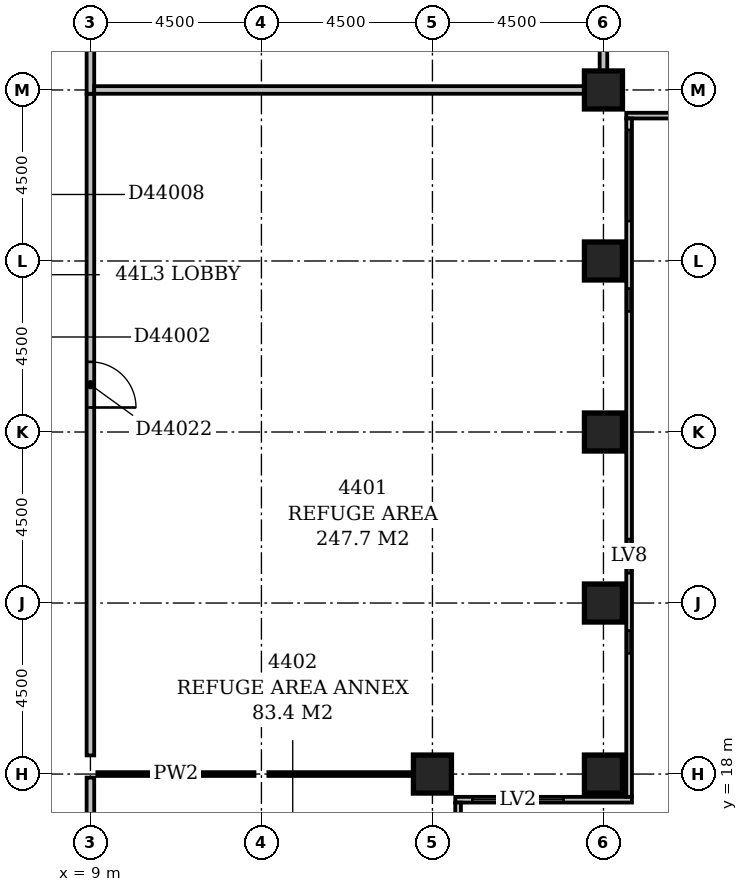
"""IFC4 building model, lengths in metres.
Left out: names, types, materials, properties, quantities, classifications, styles, units other than length and angle.
Written with IfcOpenShell. Run it as: python <this file> out.ifc"""

import sys

from ifc_helpers import new_model, si_unit, direction, frame, frame_2d, origin, origin_2d, place, context, subcontext, project, spatial, rectangle, extrude, element, fill, save


model = new_model("IFC4")
c1 = context("Model", 3, precision=1e-05, world=origin(), true_north=direction((0.0, 1.0)))
c2 = subcontext(c1, "Body", "Model", "MODEL_VIEW")
j1 = project(units=[si_unit("LENGTHUNIT", "METRE"), si_unit("PLANEANGLEUNIT", "RADIAN")], contexts=[c1])
p1 = place(None, origin())
s1 = spatial("IfcSite", under=j1, at=p1, CompositionType="ELEMENT")
p2 = place(p1, origin())
s2 = spatial("IfcBuilding", under=s1, at=p2, CompositionType="ELEMENT")
p3 = place(p2, frame((0.0, 0.0, 173.6)))
s3 = spatial("IfcBuildingStorey", under=s2, at=p3, CompositionType="ELEMENT", Elevation=173.6)
for number, where, z_axis, x_axis in (
    (1, (18.0, 18.0, -0.45), (0.0, 0.0, 1.0), (1.0, 0.0, 0.0)),
    (2, (22.5, 18.0, -0.45), (0.0, 0.0, 1.0), (1.0, 0.0, 0.0)),
    (3, (22.5, 22.5, -0.45), (0.0, 0.0, 1.0), (1.0, 0.0, 0.0)),
    (4, (22.5, 27.0, -0.45), (0.0, 0.0, 1.0), (1.0, 0.0, 0.0)),
    (5, (22.5, 31.5, -0.45), (0.0, 0.0, 1.0), (1.0, 0.0, 0.0)),
    (6, (22.5, 36.0, -0.45), (0.0, 0.0, 1.0), (1.0, 0.0, 0.0)),
):
    element("IfcColumn", number, at=place(p3, frame(where, z_axis=z_axis, x_axis=x_axis)), inside=s3, PredefinedType="COLUMN", context=c2, shape_type="SweptSolid", body=[
        extrude(rectangle(XDim=1.0, YDim=1.0, at=origin_2d()), origin(), (0.0, 0.0, 1.0), 5.55),
    ])
p4 = place(p3, frame((18.675, 8.4, 0.0), z_axis=(0.0, 0.0, 1.0), x_axis=(0.0, 1.0, 0.0)))
e7 = element("IfcWall", 7, at=p4, inside=s3, PredefinedType="STANDARD", context=c2, shape_type="SweptSolid", body=[
    extrude(rectangle(XDim=8.85, YDim=0.15, at=frame_2d((4.425, 0.0))), origin(), (0.0, 0.0, 1.0), 4.5),
])
p5 = place(p4, frame((1.467, 0.0, 0.6)))
e8 = element("IfcOpeningElement", 8, at=p5, cuts=e7, PredefinedType="OPENING", context=c2, shape_type="SweptSolid", body=[
    extrude(rectangle(XDim=1.8, YDim=2.4, at=frame_2d((0.9, 1.2))), frame((0.0, 0.087, 0.0), z_axis=(0.0, -1.0, 0.0), x_axis=(1.0, 0.0, 0.0)), (0.0, 0.0, 1.0), 0.174),
])
p6 = place(p4, frame((5.825, 0.0, 0.6)))
e9 = element("IfcOpeningElement", 9, at=p6, cuts=e7, PredefinedType="OPENING", context=c2, shape_type="SweptSolid", body=[
    extrude(rectangle(XDim=0.6, YDim=2.4, at=frame_2d((0.3, 1.2))), frame((0.0, 0.087, 0.0), z_axis=(0.0, -1.0, 0.0), x_axis=(1.0, 0.0, 0.0)), (0.0, 0.0, 1.0), 0.174),
])
p7 = place(p3, frame((18.6, 17.325, 0.0), z_axis=(0.0, 0.0, 1.0), x_axis=(1.0, 0.0, 0.0)))
e10 = element("IfcWall", 10, at=p7, inside=s3, PredefinedType="STANDARD", context=c2, shape_type="SweptSolid", body=[
    extrude(rectangle(XDim=4.65, YDim=0.15, at=frame_2d((2.325, 0.0))), origin(), (0.0, 0.0, 1.0), 4.5),
])
p8 = place(p7, frame((0.45, 0.0, 0.6)))
e11 = element("IfcOpeningElement", 11, at=p8, cuts=e10, PredefinedType="OPENING", context=c2, shape_type="SweptSolid", body=[
    extrude(rectangle(XDim=2.4, YDim=2.4, at=frame_2d((1.2, 1.2))), frame((0.0, 0.087, 0.0), z_axis=(0.0, -1.0, 0.0), x_axis=(1.0, 0.0, 0.0)), (0.0, 0.0, 1.0), 0.174),
])
p9 = place(p3, frame((23.175, 17.4, 0.0), z_axis=(0.0, 0.0, 1.0), x_axis=(0.0, 1.0, 0.0)))
e12 = element("IfcWall", 12, at=p9, inside=s3, PredefinedType="STANDARD", context=c2, shape_type="SweptSolid", body=[
    extrude(rectangle(XDim=17.85, YDim=0.15, at=frame_2d((8.925, 0.0))), origin(), (0.0, 0.0, 1.0), 4.5),
])
p10 = place(p9, frame((3.775, 0.0, 0.6)))
e13 = element("IfcOpeningElement", 13, at=p10, cuts=e12, PredefinedType="OPENING", context=c2, shape_type="SweptSolid", body=[
    extrude(rectangle(XDim=0.6, YDim=2.4, at=frame_2d((0.3, 1.2))), frame((0.0, 0.087, 0.0), z_axis=(0.0, -1.0, 0.0), x_axis=(1.0, 0.0, 0.0)), (0.0, 0.0, 1.0), 0.174),
])
p11 = place(p9, frame((5.884, 0.0, 0.6)))
e14 = element("IfcOpeningElement", 14, at=p11, cuts=e12, PredefinedType="OPENING", context=c2, shape_type="SweptSolid", body=[
    extrude(rectangle(XDim=0.9, YDim=2.4, at=frame_2d((0.45, 1.2))), frame((0.0, 0.087, 0.0), z_axis=(0.0, -1.0, 0.0), x_axis=(1.0, 0.0, 0.0)), (0.0, 0.0, 1.0), 0.174),
])
p12 = place(p9, frame((12.775, 0.0, 0.6)))
e15 = element("IfcOpeningElement", 15, at=p12, cuts=e12, PredefinedType="OPENING", context=c2, shape_type="SweptSolid", body=[
    extrude(rectangle(XDim=0.6, YDim=2.4, at=frame_2d((0.3, 1.2))), frame((0.0, 0.087, 0.0), z_axis=(0.0, -1.0, 0.0), x_axis=(1.0, 0.0, 0.0)), (0.0, 0.0, 1.0), 0.174),
])
p13 = place(p9, frame((15.15, 0.0, 0.6)))
e16 = element("IfcOpeningElement", 16, at=p13, cuts=e12, PredefinedType="OPENING", context=c2, shape_type="SweptSolid", body=[
    extrude(rectangle(XDim=2.4, YDim=2.4, at=frame_2d((1.2, 1.2))), frame((0.0, 0.087, 0.0), z_axis=(0.0, -1.0, 0.0), x_axis=(1.0, 0.0, 0.0)), (0.0, 0.0, 1.0), 0.174),
])
p14 = place(p3, frame((23.1, 35.325, 0.0), z_axis=(0.0, 0.0, 1.0), x_axis=(1.0, 0.0, 0.0)))
e17 = element("IfcWall", 17, at=p14, inside=s3, PredefinedType="STANDARD", context=c2, shape_type="SweptSolid", body=[
    extrude(rectangle(XDim=45.15, YDim=0.15, at=frame_2d((22.575, 0.0))), origin(), (0.0, 0.0, 1.0), 4.5),
])
p15 = place(p14, frame((2.575, 0.0, 0.6)))
e18 = element("IfcOpeningElement", 18, at=p15, cuts=e17, PredefinedType="OPENING", context=c2, shape_type="SweptSolid", body=[
    extrude(rectangle(XDim=0.6, YDim=2.4, at=frame_2d((0.3, 1.2))), frame((0.0, 0.087, 0.0), z_axis=(0.0, -1.0, 0.0), x_axis=(1.0, 0.0, 0.0)), (0.0, 0.0, 1.0), 0.174),
])
p16 = place(p14, frame((6.781, 0.0, 0.6)))
e19 = element("IfcOpeningElement", 19, at=p16, cuts=e17, PredefinedType="OPENING", context=c2, shape_type="SweptSolid", body=[
    extrude(rectangle(XDim=0.9, YDim=2.4, at=frame_2d((0.45, 1.2))), frame((0.0, 0.087, 0.0), z_axis=(0.0, -1.0, 0.0), x_axis=(1.0, 0.0, 0.0)), (0.0, 0.0, 1.0), 0.174),
])
p17 = place(p14, frame((11.575, 0.0, 0.6)))
e20 = element("IfcOpeningElement", 20, at=p17, cuts=e17, PredefinedType="OPENING", context=c2, shape_type="SweptSolid", body=[
    extrude(rectangle(XDim=0.6, YDim=2.4, at=frame_2d((0.3, 1.2))), frame((0.0, 0.087, 0.0), z_axis=(0.0, -1.0, 0.0), x_axis=(1.0, 0.0, 0.0)), (0.0, 0.0, 1.0), 0.174),
])
p18 = place(p14, frame((13.95, 0.0, 0.6)))
e21 = element("IfcOpeningElement", 21, at=p18, cuts=e17, PredefinedType="OPENING", context=c2, shape_type="SweptSolid", body=[
    extrude(rectangle(XDim=2.4, YDim=2.4, at=frame_2d((1.2, 1.2))), frame((0.0, 0.087, 0.0), z_axis=(0.0, -1.0, 0.0), x_axis=(1.0, 0.0, 0.0)), (0.0, 0.0, 1.0), 0.174),
])
p19 = place(p14, frame((22.95, 0.0, 0.6)))
e22 = element("IfcOpeningElement", 22, at=p19, cuts=e17, PredefinedType="OPENING", context=c2, shape_type="SweptSolid", body=[
    extrude(rectangle(XDim=2.4, YDim=2.4, at=frame_2d((1.2, 1.2))), frame((0.0, 0.087, 0.0), z_axis=(0.0, -1.0, 0.0), x_axis=(1.0, 0.0, 0.0)), (0.0, 0.0, 1.0), 0.174),
])
p20 = place(p14, frame((29.575, 0.0, 0.6)))
e23 = element("IfcOpeningElement", 23, at=p20, cuts=e17, PredefinedType="OPENING", context=c2, shape_type="SweptSolid", body=[
    extrude(rectangle(XDim=0.6, YDim=2.4, at=frame_2d((0.3, 1.2))), frame((0.0, 0.087, 0.0), z_axis=(0.0, -1.0, 0.0), x_axis=(1.0, 0.0, 0.0)), (0.0, 0.0, 1.0), 0.174),
])
p21 = place(p14, frame((31.716, 0.0, 0.6)))
e24 = element("IfcOpeningElement", 24, at=p21, cuts=e17, PredefinedType="OPENING", context=c2, shape_type="SweptSolid", body=[
    extrude(rectangle(XDim=1.2, YDim=2.4, at=frame_2d((0.6, 1.2))), frame((0.0, 0.087, 0.0), z_axis=(0.0, -1.0, 0.0), x_axis=(1.0, 0.0, 0.0)), (0.0, 0.0, 1.0), 0.174),
])
p22 = place(p14, frame((38.575, 0.0, 0.6)))
e25 = element("IfcOpeningElement", 25, at=p22, cuts=e17, PredefinedType="OPENING", context=c2, shape_type="SweptSolid", body=[
    extrude(rectangle(XDim=0.6, YDim=2.4, at=frame_2d((0.3, 1.2))), frame((0.0, 0.087, 0.0), z_axis=(0.0, -1.0, 0.0), x_axis=(1.0, 0.0, 0.0)), (0.0, 0.0, 1.0), 0.174),
])
p23 = place(p14, frame((40.95, 0.0, 0.6)))
e26 = element("IfcOpeningElement", 26, at=p23, cuts=e17, PredefinedType="OPENING", context=c2, shape_type="SweptSolid", body=[
    extrude(rectangle(XDim=2.4, YDim=2.4, at=frame_2d((1.2, 1.2))), frame((0.0, 0.087, 0.0), z_axis=(0.0, -1.0, 0.0), x_axis=(1.0, 0.0, 0.0)), (0.0, 0.0, 1.0), 0.174),
])
p24 = place(p3, frame((9.0, 9.1, 0.0), z_axis=(0.0, 0.0, 1.0), x_axis=(0.0, 1.0, 0.0)))
e27 = element("IfcWall", 27, at=p24, inside=s3, PredefinedType="PARTITIONING", context=c2, shape_type="SweptSolid", body=[
    extrude(rectangle(XDim=8.806, YDim=0.2, at=frame_2d((4.403, 0.0))), origin(), (0.0, 0.0, 1.0), 5.1),
])
p25 = place(p24, frame((3.803, 0.0, 0.0)))
e28 = element("IfcOpeningElement", 28, at=p25, cuts=e27, PredefinedType="OPENING", context=c2, shape_type="SweptSolid", body=[
    extrude(rectangle(XDim=1.2, YDim=2.1, at=frame_2d((0.6, 1.05))), frame((0.0, 0.112, 0.0), z_axis=(0.0, -1.0, 0.0), x_axis=(1.0, 0.0, 0.0)), (0.0, 0.0, 1.0), 0.224),
])
p26 = place(p3, frame((9.0, 18.49, 0.0), z_axis=(0.0, 0.0, 1.0), x_axis=(0.0, 1.0, 0.0)))
e29 = element("IfcWall", 29, at=p26, inside=s3, PredefinedType="PARTITIONING", context=c2, shape_type="SweptSolid", body=[
    extrude(rectangle(XDim=17.409, YDim=0.2, at=frame_2d((8.705, 0.0))), origin(), (0.0, 0.0, 1.0), 5.1),
])
p27 = place(p26, frame((9.155, 0.0, 0.0)))
e30 = element("IfcOpeningElement", 30, at=p27, cuts=e29, PredefinedType="OPENING", context=c2, shape_type="SweptSolid", body=[
    extrude(rectangle(XDim=1.2, YDim=2.1, at=frame_2d((0.6, 1.05))), frame((0.0, 0.112, 0.0), z_axis=(0.0, -1.0, 0.0), x_axis=(1.0, 0.0, 0.0)), (0.0, 0.0, 1.0), 0.224),
])
p28 = place(p3, frame((17.809, 18.0, 0.0), z_axis=(0.0, 0.0, 1.0), x_axis=(-1.0, 0.0, 0.0)))
e31 = element("IfcWall", 31, at=p28, inside=s3, PredefinedType="PARTITIONING", context=c2, shape_type="SweptSolid", body=[
    extrude(rectangle(XDim=4.125, YDim=0.1, at=frame_2d((2.063, 0.0))), origin(), (0.0, 0.0, 1.0), 5.1),
])
p29 = place(p3, frame((13.317, 18.0, 0.0), z_axis=(0.0, 0.0, 1.0), x_axis=(-1.0, 0.0, 0.0)))
e32 = element("IfcWall", 32, at=p29, inside=s3, PredefinedType="PARTITIONING", context=c2, shape_type="SweptSolid", body=[
    extrude(rectangle(XDim=4.134, YDim=0.1, at=frame_2d((2.067, 0.0))), origin(), (0.0, 0.0, 1.0), 5.1),
])
p30 = place(p3, frame((9.1, 36.0, 0.0), z_axis=(0.0, 0.0, 1.0), x_axis=(1.0, 0.0, 0.0)))
e33 = element("IfcWall", 33, at=p30, inside=s3, PredefinedType="PARTITIONING", context=c2, shape_type="SweptSolid", body=[
    extrude(rectangle(XDim=13.208, YDim=0.2, at=frame_2d((6.604, 0.0))), origin(), (0.0, 0.0, 1.0), 5.1),
])
p31 = place(p3, frame((9.0, 35.9, 0.0), z_axis=(0.0, 0.0, 1.0), x_axis=(0.0, 1.0, 0.0)))
e34 = element("IfcWall", 34, at=p31, inside=s3, PredefinedType="PARTITIONING", context=c2, shape_type="SweptSolid", body=[
    extrude(rectangle(XDim=13.5, YDim=0.2, at=frame_2d((6.75, 0.0))), origin(), (0.0, 0.0, 1.0), 5.1),
])
p32 = place(p3, frame((22.5, 36.191, 0.0), z_axis=(0.0, 0.0, 1.0), x_axis=(0.0, 1.0, 0.0)))
e35 = element("IfcWall", 35, at=p32, inside=s3, PredefinedType="PARTITIONING", context=c2, shape_type="SweptSolid", body=[
    extrude(rectangle(XDim=13.208, YDim=0.2, at=frame_2d((6.604, 0.0))), origin(), (0.0, 0.0, 1.0), 5.1),
])
p33 = place(p8, origin())
e36 = element("IfcWindow", 36, at=p33, inside=s3, PartitioningType="SINGLE_PANEL", PredefinedType="USERDEFINED", context=c2, shape_type="SweptSolid", body=[
    extrude(rectangle(XDim=2.4, YDim=2.4, at=frame_2d((1.2, 1.2))), frame((0.0, 0.03, 0.0), z_axis=(0.0, -1.0, 0.0), x_axis=(1.0, 0.0, 0.0)), (0.0, 0.0, 1.0), 0.06),
])
fill(e11, e36)
p34 = place(p10, origin())
e37 = element("IfcWindow", 37, at=p34, inside=s3, PartitioningType="SINGLE_PANEL", PredefinedType="USERDEFINED", context=c2, shape_type="SweptSolid", body=[
    extrude(rectangle(XDim=0.6, YDim=2.4, at=frame_2d((0.3, 1.2))), frame((0.0, 0.03, 0.0), z_axis=(0.0, -1.0, 0.0), x_axis=(1.0, 0.0, 0.0)), (0.0, 0.0, 1.0), 0.06),
])
fill(e13, e37)
p35 = place(p11, origin())
e38 = element("IfcWindow", 38, at=p35, inside=s3, PartitioningType="SINGLE_PANEL", PredefinedType="USERDEFINED", context=c2, shape_type="SweptSolid", body=[
    extrude(rectangle(XDim=0.9, YDim=2.4, at=frame_2d((0.45, 1.2))), frame((0.0, 0.03, 0.0), z_axis=(0.0, -1.0, 0.0), x_axis=(1.0, 0.0, 0.0)), (0.0, 0.0, 1.0), 0.06),
])
fill(e14, e38)
p36 = place(p12, origin())
e39 = element("IfcWindow", 39, at=p36, inside=s3, PartitioningType="SINGLE_PANEL", PredefinedType="USERDEFINED", context=c2, shape_type="SweptSolid", body=[
    extrude(rectangle(XDim=0.6, YDim=2.4, at=frame_2d((0.3, 1.2))), frame((0.0, 0.03, 0.0), z_axis=(0.0, -1.0, 0.0), x_axis=(1.0, 0.0, 0.0)), (0.0, 0.0, 1.0), 0.06),
])
fill(e15, e39)
p37 = place(p13, origin())
e40 = element("IfcWindow", 40, at=p37, inside=s3, PartitioningType="SINGLE_PANEL", PredefinedType="USERDEFINED", context=c2, shape_type="SweptSolid", body=[
    extrude(rectangle(XDim=2.4, YDim=2.4, at=frame_2d((1.2, 1.2))), frame((0.0, 0.03, 0.0), z_axis=(0.0, -1.0, 0.0), x_axis=(1.0, 0.0, 0.0)), (0.0, 0.0, 1.0), 0.06),
])
fill(e16, e40)
p38 = place(p27, frame((1.2, 0.0, 0.0), z_axis=(0.0, 0.0, 1.0), x_axis=(-1.0, 0.0, 0.0)))
e41 = element("IfcDoor", 41, at=p38, inside=s3, OperationType="SINGLE_SWING_RIGHT", PredefinedType="DOOR", context=c2, shape_type="SweptSolid", body=[
    extrude(rectangle(XDim=1.2, YDim=2.1, at=frame_2d((0.6, 1.05))), frame((0.0, 0.025, 0.0), z_axis=(0.0, -1.0, 0.0), x_axis=(1.0, 0.0, 0.0)), (0.0, 0.0, 1.0), 0.05),
])
fill(e30, e41)
save(model, sys.argv[1])
